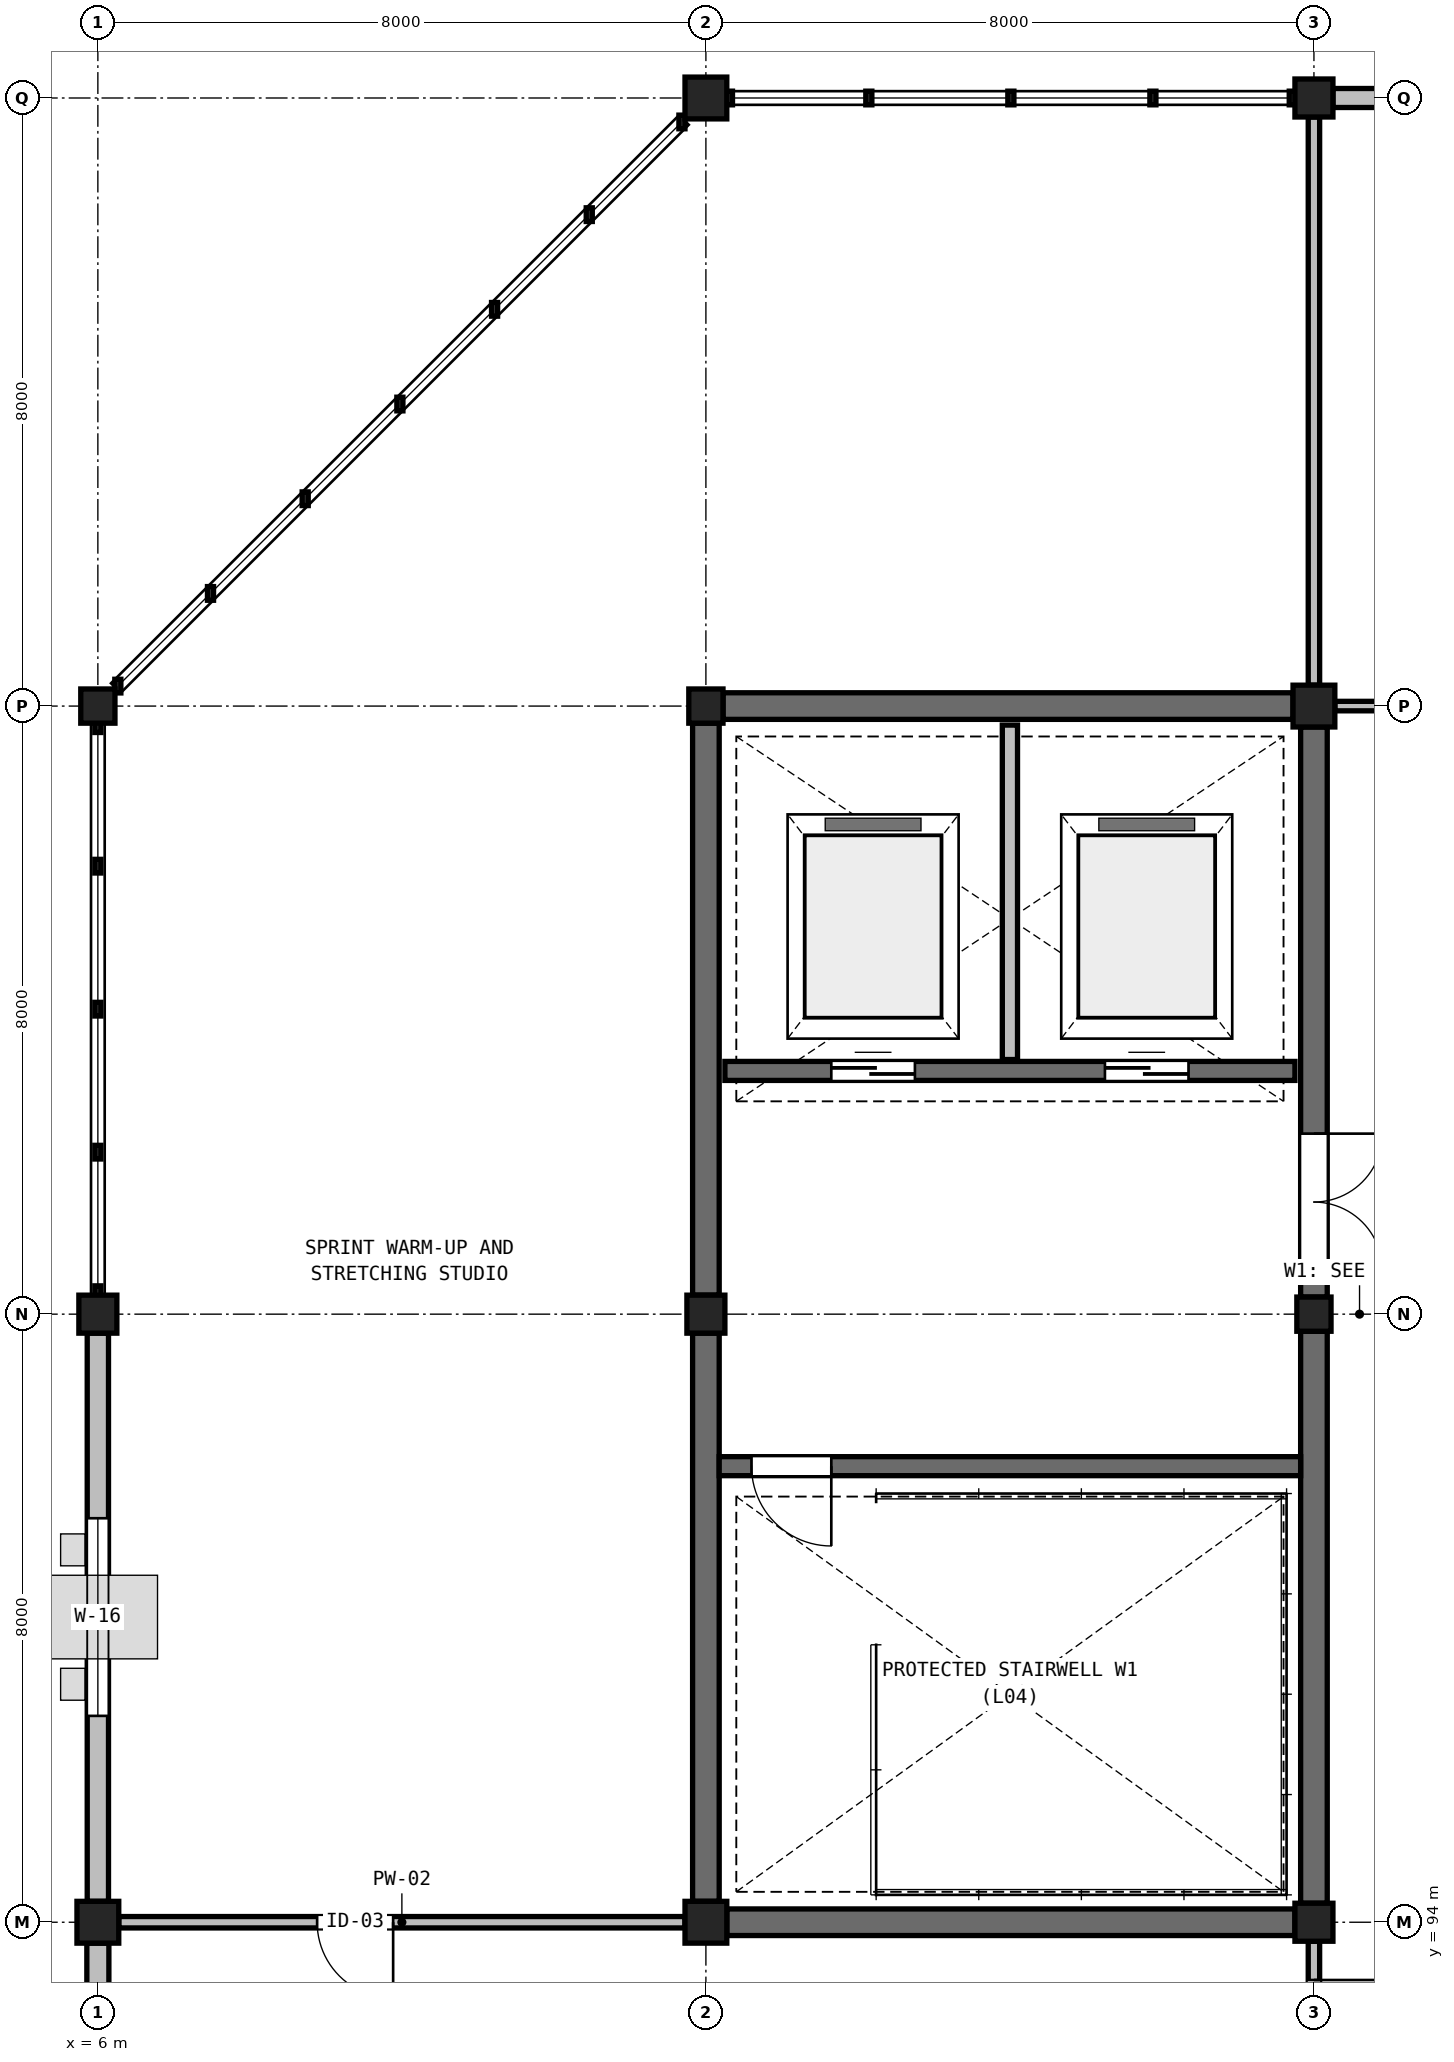
"""IFC4 building model, lengths in metres.
Left out: names, types, materials, properties, quantities, classifications, styles, units other than length and angle.
Written with IfcOpenShell. Run it as: python <this file> out.ifc"""

import sys

from ifc_helpers import new_model, si_unit, direction, frame, frame_2d, origin, origin_2d, place, context, subcontext, project, spatial, rectangle, extrude, element, fill, save


model = new_model("IFC4")
c1 = context("Model", 3, precision=1e-05, world=origin(), true_north=direction((0.0, 1.0)))
c2 = subcontext(c1, "Body", "Model", "MODEL_VIEW")
j1 = project(units=[si_unit("LENGTHUNIT", "METRE"), si_unit("PLANEANGLEUNIT", "RADIAN")], contexts=[c1])
p1 = place(None, origin())
s1 = spatial("IfcSite", under=j1, at=p1, CompositionType="ELEMENT")
p2 = place(p1, origin())
s2 = spatial("IfcBuilding", under=s1, at=p2, CompositionType="ELEMENT")
p3 = place(p2, frame((0.0, 0.0, 19.2)))
s3 = spatial("IfcBuildingStorey", under=s2, at=p3, CompositionType="ELEMENT", Elevation=19.2)
p4 = place(p3, frame((6.0, 94.0, 0.0), z_axis=(0.0, 0.0, 1.0), x_axis=(1.0, 0.0, 0.0)))
e1 = element("IfcColumn", 1, at=p4, inside=s3, PredefinedType="COLUMN", context=c2, shape_type="SweptSolid", body=[
    extrude(rectangle(XDim=0.55, YDim=0.55, at=origin_2d()), origin(), (0.0, 0.0, 1.0), 4.2),
])
p5 = place(p3, frame((6.0, 102.0, 0.0), z_axis=(0.0, 0.0, 1.0), x_axis=(1.0, 0.0, 0.0)))
e2 = element("IfcColumn", 2, at=p5, inside=s3, PredefinedType="COLUMN", context=c2, shape_type="SweptSolid", body=[
    extrude(rectangle(XDim=0.5, YDim=0.5, at=origin_2d()), origin(), (0.0, 0.0, 1.0), 4.2),
])
p6 = place(p3, frame((6.0, 110.0, 0.0), z_axis=(0.0, 0.0, 1.0), x_axis=(1.0, 0.0, 0.0)))
e3 = element("IfcColumn", 3, at=p6, inside=s3, PredefinedType="COLUMN", context=c2, shape_type="SweptSolid", body=[
    extrude(rectangle(XDim=0.45, YDim=0.45, at=origin_2d()), origin(), (0.0, 0.0, 1.0), 4.2),
])
p7 = place(p3, frame((14.0, 94.0, 0.0), z_axis=(0.0, 0.0, 1.0), x_axis=(1.0, 0.0, 0.0)))
e4 = element("IfcColumn", 4, at=p7, inside=s3, PredefinedType="COLUMN", context=c2, shape_type="SweptSolid", body=[
    extrude(rectangle(XDim=0.55, YDim=0.55, at=origin_2d()), origin(), (0.0, 0.0, 1.0), 4.2),
])
p8 = place(p3, frame((14.0, 102.0, 0.0), z_axis=(0.0, 0.0, 1.0), x_axis=(1.0, 0.0, 0.0)))
e5 = element("IfcColumn", 5, at=p8, inside=s3, PredefinedType="COLUMN", context=c2, shape_type="SweptSolid", body=[
    extrude(rectangle(XDim=0.5, YDim=0.5, at=origin_2d()), origin(), (0.0, 0.0, 1.0), 4.2),
])
p9 = place(p3, frame((14.0, 110.0, 0.0), z_axis=(0.0, 0.0, 1.0), x_axis=(1.0, 0.0, 0.0)))
e6 = element("IfcColumn", 6, at=p9, inside=s3, PredefinedType="COLUMN", context=c2, shape_type="SweptSolid", body=[
    extrude(rectangle(XDim=0.45, YDim=0.45, at=origin_2d()), origin(), (0.0, 0.0, 1.0), 4.2),
])
p10 = place(p3, frame((14.0, 118.0, 0.0), z_axis=(0.0, 0.0, 1.0), x_axis=(1.0, 0.0, 0.0)))
e7 = element("IfcColumn", 7, at=p10, inside=s3, PredefinedType="COLUMN", context=c2, shape_type="SweptSolid", body=[
    extrude(rectangle(XDim=0.55, YDim=0.55, at=origin_2d()), origin(), (0.0, 0.0, 1.0), 4.2),
])
p11 = place(p3, frame((22.0, 94.0, 0.0), z_axis=(0.0, 0.0, 1.0), x_axis=(1.0, 0.0, 0.0)))
e8 = element("IfcColumn", 8, at=p11, inside=s3, PredefinedType="COLUMN", context=c2, shape_type="SweptSolid", body=[
    extrude(rectangle(XDim=0.5, YDim=0.5, at=origin_2d()), origin(), (0.0, 0.0, 1.0), 4.2),
])
p12 = place(p3, frame((22.0, 102.0, 0.0), z_axis=(0.0, 0.0, 1.0), x_axis=(1.0, 0.0, 0.0)))
e9 = element("IfcColumn", 9, at=p12, inside=s3, PredefinedType="COLUMN", context=c2, shape_type="SweptSolid", body=[
    extrude(rectangle(XDim=0.45, YDim=0.45, at=origin_2d()), origin(), (0.0, 0.0, 1.0), 4.2),
])
p13 = place(p3, frame((22.0, 110.0, 0.0), z_axis=(0.0, 0.0, 1.0), x_axis=(1.0, 0.0, 0.0)))
e10 = element("IfcColumn", 10, at=p13, inside=s3, PredefinedType="COLUMN", context=c2, shape_type="SweptSolid", body=[
    extrude(rectangle(XDim=0.55, YDim=0.55, at=origin_2d()), origin(), (0.0, 0.0, 1.0), 4.2),
])
p14 = place(p3, frame((22.0, 118.0, 0.0), z_axis=(0.0, 0.0, 1.0), x_axis=(1.0, 0.0, 0.0)))
e11 = element("IfcColumn", 11, at=p14, inside=s3, PredefinedType="COLUMN", context=c2, shape_type="SweptSolid", body=[
    extrude(rectangle(XDim=0.5, YDim=0.5, at=origin_2d()), origin(), (0.0, 0.0, 1.0), 4.2),
])
p15 = place(p3, frame((22.25, 118.0, 0.0), z_axis=(0.0, 0.0, 1.0), x_axis=(1.0, 0.0, 0.0)))
e12 = element("IfcWall", 12, at=p15, inside=s3, PredefinedType="SOLIDWALL", context=c2, shape_type="SweptSolid", body=[
    extrude(rectangle(XDim=7.525, YDim=0.25, at=frame_2d((3.762, 0.0))), origin(), (0.0, 0.0, 1.0), 3.17),
])
p16 = place(p15, frame((0.85, 0.0, 1.35)))
e13 = element("IfcOpeningElement", 13, at=p16, cuts=e12, PredefinedType="OPENING", context=c2, shape_type="SweptSolid", body=[
    extrude(rectangle(XDim=0.9, YDim=1.2, at=frame_2d((0.45, 0.6))), frame((0.0, 0.135, 0.0), z_axis=(0.0, -1.0, 0.0), x_axis=(1.0, 0.0, 0.0)), (0.0, 0.0, 1.0), 0.27),
])
p17 = place(p15, frame((5.62, 0.0, 0.9)))
e14 = element("IfcOpeningElement", 14, at=p17, cuts=e12, PredefinedType="OPENING", context=c2, shape_type="SweptSolid", body=[
    extrude(rectangle(XDim=0.95, YDim=1.65, at=frame_2d((0.475, 0.825))), frame((0.0, 0.135, 0.0), z_axis=(0.0, -1.0, 0.0), x_axis=(1.0, 0.0, 0.0)), (0.0, 0.0, 1.0), 0.27),
])
p18 = place(p3, frame((6.0, 86.225, 0.0), z_axis=(0.0, 0.0, 1.0), x_axis=(0.0, 1.0, 0.0)))
e15 = element("IfcWall", 15, at=p18, inside=s3, PredefinedType="SOLIDWALL", context=c2, shape_type="SweptSolid", body=[
    extrude(rectangle(XDim=7.5, YDim=0.29, at=frame_2d((3.75, 0.0))), origin(), (0.0, 0.0, 1.0), 3.22),
])
p19 = place(p18, frame((0.85, 0.0, 1.35)))
e16 = element("IfcOpeningElement", 16, at=p19, cuts=e15, PredefinedType="OPENING", context=c2, shape_type="SweptSolid", body=[
    extrude(rectangle(XDim=0.9, YDim=1.2, at=frame_2d((0.45, 0.6))), frame((0.0, 0.155, 0.0), z_axis=(0.0, -1.0, 0.0), x_axis=(1.0, 0.0, 0.0)), (0.0, 0.0, 1.0), 0.31),
])
p20 = place(p18, frame((5.6, 0.0, 0.9)))
e17 = element("IfcOpeningElement", 17, at=p20, cuts=e15, PredefinedType="OPENING", context=c2, shape_type="SweptSolid", body=[
    extrude(rectangle(XDim=0.95, YDim=1.65, at=frame_2d((0.475, 0.825))), frame((0.0, 0.155, 0.0), z_axis=(0.0, -1.0, 0.0), x_axis=(1.0, 0.0, 0.0)), (0.0, 0.0, 1.0), 0.31),
])
p21 = place(p3, frame((6.0, 94.275, 0.0), z_axis=(0.0, 0.0, 1.0), x_axis=(0.0, 1.0, 0.0)))
e18 = element("IfcWall", 18, at=p21, inside=s3, PredefinedType="SOLIDWALL", context=c2, shape_type="SweptSolid", body=[
    extrude(rectangle(XDim=7.475, YDim=0.28, at=frame_2d((3.738, 0.0))), origin(), (0.0, 0.0, 1.0), 3.07),
])
p22 = place(p21, frame((2.44, 0.0, 1.45)))
e19 = element("IfcOpeningElement", 19, at=p22, cuts=e18, PredefinedType="OPENING", context=c2, shape_type="SweptSolid", body=[
    extrude(rectangle(XDim=2.6, YDim=1.1, at=frame_2d((1.3, 0.55))), frame((0.0, 0.15, 0.0), z_axis=(0.0, -1.0, 0.0), x_axis=(1.0, 0.0, 0.0)), (0.0, 0.0, 1.0), 0.3),
])
p23 = place(p3, frame((14.275, 94.0, 0.0), z_axis=(0.0, 0.0, 1.0), x_axis=(1.0, 0.0, 0.0)))
e20 = element("IfcWall", 20, at=p23, inside=s3, PredefinedType="SHEAR", context=c2, shape_type="SweptSolid", body=[
    extrude(rectangle(XDim=7.475, YDim=0.35, at=frame_2d((3.738, 0.0))), origin(), (0.0, 0.0, 1.0), 3.98),
])
p24 = place(p3, frame((14.225, 110.0, 0.0), z_axis=(0.0, 0.0, 1.0), x_axis=(1.0, 0.0, 0.0)))
e21 = element("IfcWall", 21, at=p24, inside=s3, PredefinedType="SHEAR", context=c2, shape_type="SweptSolid", body=[
    extrude(rectangle(XDim=7.5, YDim=0.35, at=frame_2d((3.75, 0.0))), origin(), (0.0, 0.0, 1.0), 3.98),
])
p25 = place(p3, frame((14.0, 94.275, 0.0), z_axis=(0.0, 0.0, 1.0), x_axis=(0.0, 1.0, 0.0)))
e22 = element("IfcWall", 22, at=p25, inside=s3, PredefinedType="SHEAR", context=c2, shape_type="SweptSolid", body=[
    extrude(rectangle(XDim=7.475, YDim=0.35, at=frame_2d((3.738, 0.0))), origin(), (0.0, 0.0, 1.0), 3.98),
])
for number, where, z_axis, x_axis in (
    (23, (14.0, 102.25, 0.0), (0.0, 0.0, 1.0), (0.0, 1.0, 0.0)),
    (24, (22.0, 94.25, 0.0), (0.0, 0.0, 1.0), (0.0, 1.0, 0.0)),
):
    element("IfcWall", number, at=place(p3, frame(where, z_axis=z_axis, x_axis=x_axis)), inside=s3, PredefinedType="SHEAR", context=c2, shape_type="SweptSolid", body=[
        extrude(rectangle(XDim=7.525, YDim=0.35, at=frame_2d((3.762, 0.0))), origin(), (0.0, 0.0, 1.0), 3.98),
    ])
p26 = place(p3, frame((22.0, 102.225, 0.0), z_axis=(0.0, 0.0, 1.0), x_axis=(0.0, 1.0, 0.0)))
e25 = element("IfcWall", 25, at=p26, inside=s3, PredefinedType="SHEAR", context=c2, shape_type="SweptSolid", body=[
    extrude(rectangle(XDim=7.5, YDim=0.35, at=frame_2d((3.75, 0.0))), origin(), (0.0, 0.0, 1.0), 3.98),
])
p27 = place(p26, frame((0.35, 0.0, 0.0)))
e26 = element("IfcOpeningElement", 26, at=p27, cuts=e25, PredefinedType="OPENING", context=c2, shape_type="SweptSolid", body=[
    extrude(rectangle(XDim=1.8, YDim=2.2, at=frame_2d((0.9, 1.1))), frame((0.0, 0.185, 0.0), z_axis=(0.0, -1.0, 0.0), x_axis=(1.0, 0.0, 0.0)), (0.0, 0.0, 1.0), 0.37),
])
p28 = place(p3, frame((14.175, 100.0, 0.0), z_axis=(0.0, 0.0, 1.0), x_axis=(1.0, 0.0, 0.0)))
e27 = element("IfcWall", 27, at=p28, inside=s3, PredefinedType="SOLIDWALL", context=c2, shape_type="SweptSolid", body=[
    extrude(rectangle(XDim=7.65, YDim=0.25, at=frame_2d((3.825, 0.0))), origin(), (0.0, 0.0, 1.0), 3.98),
])
p29 = place(p28, frame((0.425, 0.0, 0.0)))
e28 = element("IfcOpeningElement", 28, at=p29, cuts=e27, PredefinedType="OPENING", context=c2, shape_type="SweptSolid", body=[
    extrude(rectangle(XDim=1.05, YDim=2.2, at=frame_2d((0.525, 1.1))), frame((0.0, 0.135, 0.0), z_axis=(0.0, -1.0, 0.0), x_axis=(1.0, 0.0, 0.0)), (0.0, 0.0, 1.0), 0.27),
])
p30 = place(p3, frame((14.25, 105.2, 0.0), z_axis=(0.0, 0.0, 1.0), x_axis=(1.0, 0.0, 0.0)))
e29 = element("IfcWall", 29, at=p30, inside=s3, PredefinedType="SOLIDWALL", context=c2, shape_type="SweptSolid", body=[
    extrude(rectangle(XDim=7.5, YDim=0.25, at=frame_2d((3.75, 0.0))), origin(), (0.0, 0.0, 1.0), 3.98),
])
p31 = place(p30, frame((1.4, 0.0, 0.0)))
e30 = element("IfcOpeningElement", 30, at=p31, cuts=e29, PredefinedType="OPENING", context=c2, shape_type="SweptSolid", body=[
    extrude(rectangle(XDim=1.1, YDim=2.2, at=frame_2d((0.55, 1.1))), frame((0.0, 0.135, 0.0), z_axis=(0.0, -1.0, 0.0), x_axis=(1.0, 0.0, 0.0)), (0.0, 0.0, 1.0), 0.27),
])
p32 = place(p30, frame((5.0, 0.0, 0.0)))
e31 = element("IfcOpeningElement", 31, at=p32, cuts=e29, PredefinedType="OPENING", context=c2, shape_type="SweptSolid", body=[
    extrude(rectangle(XDim=1.1, YDim=2.2, at=frame_2d((0.55, 1.1))), frame((0.0, 0.135, 0.0), z_axis=(0.0, -1.0, 0.0), x_axis=(1.0, 0.0, 0.0)), (0.0, 0.0, 1.0), 0.27),
])
p33 = place(p3, frame((18.0, 105.35, 0.0), z_axis=(0.0, 0.0, 1.0), x_axis=(0.0, 1.0, 0.0)))
e32 = element("IfcWall", 32, at=p33, inside=s3, PredefinedType="PARTITIONING", context=c2, shape_type="SweptSolid", body=[
    extrude(rectangle(XDim=4.4, YDim=0.2, at=frame_2d((2.2, 0.0))), origin(), (0.0, 0.0, 1.0), 3.9),
])
p34 = place(p3, frame((6.275, 94.0, 0.0), z_axis=(0.0, 0.0, 1.0), x_axis=(1.0, 0.0, 0.0)))
e33 = element("IfcWall", 33, at=p34, inside=s3, PredefinedType="PARTITIONING", context=c2, shape_type="SweptSolid", body=[
    extrude(rectangle(XDim=7.45, YDim=0.15, at=frame_2d((3.725, 0.0))), origin(), (0.0, 0.0, 1.0), 3.27),
])
p35 = place(p34, frame((2.61, 0.0, 0.0)))
e34 = element("IfcOpeningElement", 34, at=p35, cuts=e33, PredefinedType="OPENING", context=c2, shape_type="SweptSolid", body=[
    extrude(rectangle(XDim=1.0, YDim=2.15, at=frame_2d((0.5, 1.075))), frame((0.0, 0.085, 0.0), z_axis=(0.0, -1.0, 0.0), x_axis=(1.0, 0.0, 0.0)), (0.0, 0.0, 1.0), 0.17),
])
p36 = place(p3, frame((22.0, 90.8, 0.0), z_axis=(0.0, 0.0, 1.0), x_axis=(0.0, 1.0, 0.0)))
e35 = element("IfcWall", 35, at=p36, inside=s3, PredefinedType="PARTITIONING", context=c2, shape_type="SweptSolid", body=[
    extrude(rectangle(XDim=2.95, YDim=0.15, at=frame_2d((1.475, 0.0))), origin(), (0.0, 0.0, 1.0), 3.07),
])
p37 = place(p36, frame((0.74, 0.0, 0.0)))
e36 = element("IfcOpeningElement", 36, at=p37, cuts=e35, PredefinedType="OPENING", context=c2, shape_type="SweptSolid", body=[
    extrude(rectangle(XDim=1.7, YDim=2.25, at=frame_2d((0.85, 1.125))), frame((0.0, 0.085, 0.0), z_axis=(0.0, -1.0, 0.0), x_axis=(1.0, 0.0, 0.0)), (0.0, 0.0, 1.0), 0.17),
])
p38 = place(p3, frame((22.0, 110.275, 0.0), z_axis=(0.0, 0.0, 1.0), x_axis=(0.0, 1.0, 0.0)))
e37 = element("IfcWall", 37, at=p38, inside=s3, PredefinedType="PARTITIONING", context=c2, shape_type="SweptSolid", body=[
    extrude(rectangle(XDim=7.475, YDim=0.15, at=frame_2d((3.738, 0.0))), origin(), (0.0, 0.0, 1.0), 2.97),
])
p39 = place(p3, frame((22.275, 110.0, 0.0), z_axis=(0.0, 0.0, 1.0), x_axis=(1.0, 0.0, 0.0)))
e38 = element("IfcWall", 38, at=p39, inside=s3, PredefinedType="PARTITIONING", context=c2, shape_type="SweptSolid", body=[
    extrude(rectangle(XDim=3.825, YDim=0.125, at=frame_2d((1.913, 0.0))), origin(), (0.0, 0.0, 1.0), 3.27),
])
p40 = place(p39, frame((1.15, 0.0, 0.0)))
e39 = element("IfcOpeningElement", 39, at=p40, cuts=e38, PredefinedType="OPENING", context=c2, shape_type="SweptSolid", body=[
    extrude(rectangle(XDim=0.9, YDim=2.1, at=frame_2d((0.45, 1.05))), frame((0.0, 0.073, 0.0), z_axis=(0.0, -1.0, 0.0), x_axis=(1.0, 0.0, 0.0)), (0.0, 0.0, 1.0), 0.145),
])
p41 = place(p22, origin())
e40 = element("IfcWindow", 40, at=p41, inside=s3, PartitioningType="SINGLE_PANEL", PredefinedType="WINDOW", context=c2, shape_type="SweptSolid", body=[
    extrude(rectangle(XDim=2.6, YDim=1.1, at=frame_2d((1.3, 0.55))), frame((0.0, 0.03, 0.0), z_axis=(0.0, -1.0, 0.0), x_axis=(1.0, 0.0, 0.0)), (0.0, 0.0, 1.0), 0.06),
])
fill(e19, e40)
p42 = place(p27, frame((1.8, 0.0, 0.0), z_axis=(0.0, 0.0, 1.0), x_axis=(-1.0, 0.0, 0.0)))
e41 = element("IfcDoor", 41, at=p42, inside=s3, OperationType="DOUBLE_DOOR_SINGLE_SWING", PredefinedType="DOOR", context=c2, shape_type="SweptSolid", body=[
    extrude(rectangle(XDim=1.8, YDim=2.2, at=frame_2d((0.9, 1.1))), frame((0.0, 0.025, 0.0), z_axis=(0.0, -1.0, 0.0), x_axis=(1.0, 0.0, 0.0)), (0.0, 0.0, 1.0), 0.05),
])
fill(e26, e41)
p43 = place(p29, frame((1.05, 0.0, 0.0), z_axis=(0.0, 0.0, 1.0), x_axis=(-1.0, 0.0, 0.0)))
e42 = element("IfcDoor", 42, at=p43, inside=s3, OperationType="SINGLE_SWING_RIGHT", PredefinedType="DOOR", context=c2, shape_type="SweptSolid", body=[
    extrude(rectangle(XDim=1.05, YDim=2.2, at=frame_2d((0.525, 1.1))), frame((0.0, 0.025, 0.0), z_axis=(0.0, -1.0, 0.0), x_axis=(1.0, 0.0, 0.0)), (0.0, 0.0, 1.0), 0.05),
])
fill(e28, e42)
p44 = place(p31, origin())
e43 = element("IfcDoor", 43, at=p44, inside=s3, OperationType="DOUBLE_DOOR_SLIDING", PredefinedType="DOOR", context=c2, shape_type="SweptSolid", body=[
    extrude(rectangle(XDim=1.1, YDim=2.2, at=frame_2d((0.55, 1.1))), frame((0.0, 0.025, 0.0), z_axis=(0.0, -1.0, 0.0), x_axis=(1.0, 0.0, 0.0)), (0.0, 0.0, 1.0), 0.05),
])
fill(e30, e43)
p45 = place(p32, origin())
e44 = element("IfcDoor", 44, at=p45, inside=s3, OperationType="DOUBLE_DOOR_SLIDING", PredefinedType="DOOR", context=c2, shape_type="SweptSolid", body=[
    extrude(rectangle(XDim=1.1, YDim=2.2, at=frame_2d((0.55, 1.1))), frame((0.0, 0.025, 0.0), z_axis=(0.0, -1.0, 0.0), x_axis=(1.0, 0.0, 0.0)), (0.0, 0.0, 1.0), 0.05),
])
fill(e31, e44)
p46 = place(p35, frame((1.0, 0.0, 0.0), z_axis=(0.0, 0.0, 1.0), x_axis=(-1.0, 0.0, 0.0)))
e45 = element("IfcDoor", 45, at=p46, inside=s3, OperationType="SINGLE_SWING_RIGHT", PredefinedType="DOOR", context=c2, shape_type="SweptSolid", body=[
    extrude(rectangle(XDim=1.0, YDim=2.15, at=frame_2d((0.5, 1.075))), frame((0.0, 0.025, 0.0), z_axis=(0.0, -1.0, 0.0), x_axis=(1.0, 0.0, 0.0)), (0.0, 0.0, 1.0), 0.05),
])
fill(e34, e45)
p47 = place(p37, frame((1.7, 0.0, 0.0), z_axis=(0.0, 0.0, 1.0), x_axis=(-1.0, 0.0, 0.0)))
e46 = element("IfcDoor", 46, at=p47, inside=s3, OperationType="DOUBLE_DOOR_SINGLE_SWING", PredefinedType="DOOR", context=c2, shape_type="SweptSolid", body=[
    extrude(rectangle(XDim=1.7, YDim=2.25, at=frame_2d((0.85, 1.125))), frame((0.0, 0.025, 0.0), z_axis=(0.0, -1.0, 0.0), x_axis=(1.0, 0.0, 0.0)), (0.0, 0.0, 1.0), 0.05),
])
fill(e36, e46)
save(model, sys.argv[1])
